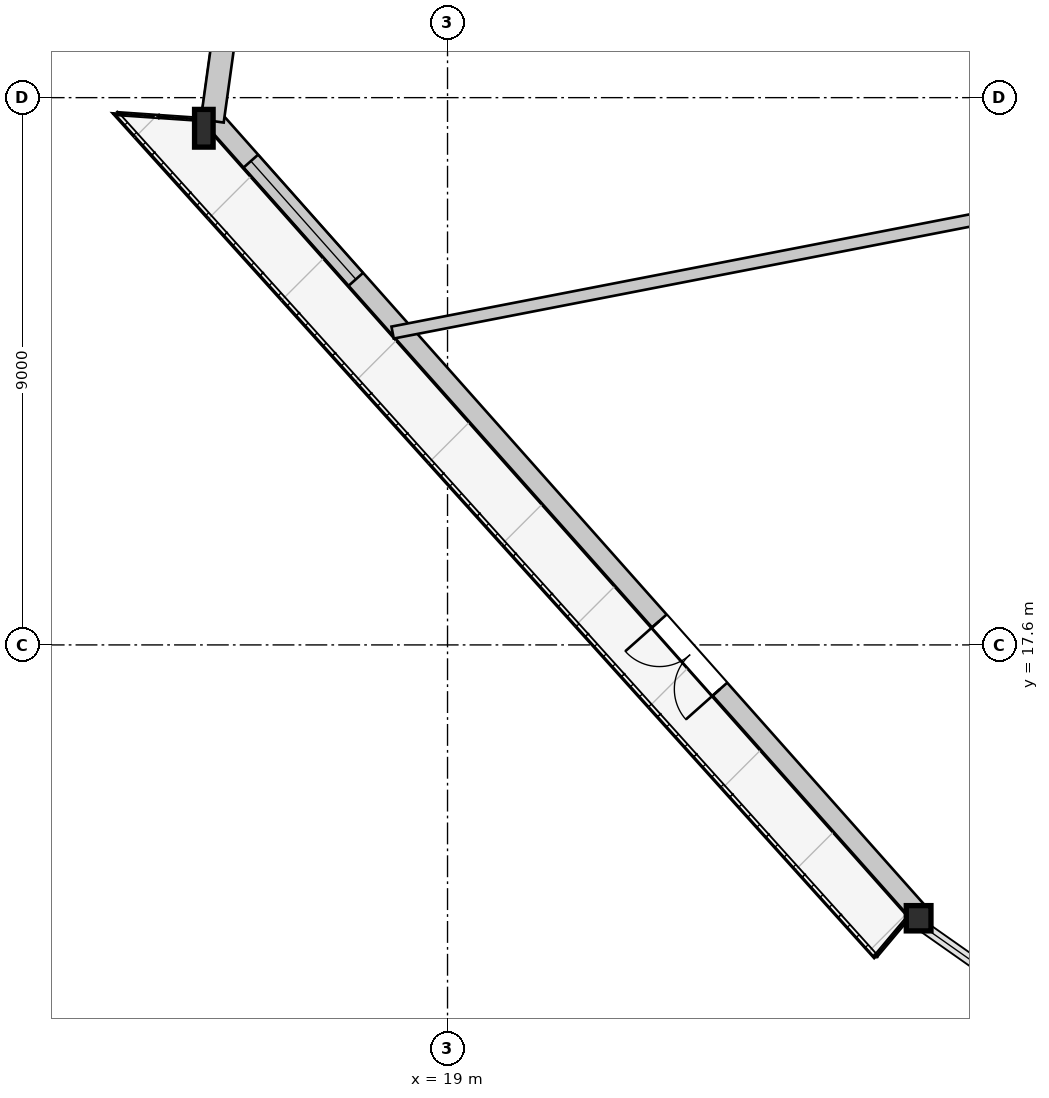
"""IFC4 building model, lengths in metres.
Left out: names, types, materials, properties, quantities, classifications, styles, units other than length and angle.
Written with IfcOpenShell. Run it as: python <this file> out.ifc"""

import sys

from ifc_helpers import new_model, si_unit, direction, frame, frame_2d, origin, origin_2d, place, context, subcontext, project, spatial, rectangle, i_section, extrude, source, transform, mapped, element, fill, save


model = new_model("IFC4")
c1 = context("Model", 3, precision=1e-05, world=origin(), true_north=direction((0.0, 1.0)))
c2 = subcontext(c1, "Body", "Model", "MODEL_VIEW")
j1 = project(units=[si_unit("LENGTHUNIT", "METRE"), si_unit("PLANEANGLEUNIT", "RADIAN")], contexts=[c1])
p1 = place(None, origin())
s1 = spatial("IfcSite", under=j1, at=p1, CompositionType="ELEMENT")
p2 = place(p1, origin())
s2 = spatial("IfcBuilding", under=s1, at=p2, CompositionType="ELEMENT")
p3 = place(p2, frame((0.0, 0.0, 238.1)))
s3 = spatial("IfcBuildingStorey", under=s2, at=p3, CompositionType="ELEMENT", Elevation=238.1)
m1 = source(origin(), c2, "Body", "SweptSolid", [
    extrude(i_section(OverallWidth=0.305, OverallDepth=0.62, WebThickness=0.021, FlangeThickness=0.04, at=origin_2d()), origin(), (0.0, 0.0, 1.0), 3.449),
])
p4 = place(p3, frame((14.942, 26.242, 0.0), z_axis=(0.028883824761, -0.084598457326, 0.99599639843), x_axis=(0.946361669056, 0.323109256046, 0.0)))
e1 = element("IfcColumn", 1, at=p4, inside=s3, PredefinedType="COLUMN", context=c2, shape_type="MappedRepresentation", body=[
    mapped(m1, transform((0.0, 0.0, 0.0), x_axis=(1.0, 0.0, 0.0), y_axis=(0.0, 1.0, 0.0), z_axis=(0.0, 0.0, 1.0), scale=1.0)),
])
m2 = source(origin(), c2, "Body", "SweptSolid", [
    extrude(i_section(OverallWidth=0.406, OverallDepth=0.416, WebThickness=0.027, FlangeThickness=0.042, at=origin_2d()), origin(), (0.0, 0.0, 1.0), 3.45),
])
p5 = place(p3, frame((26.589, 13.131, 0.0), z_axis=(0.091929151613, -0.015073833174, 0.995651450377), x_axis=(0.161811410383, 0.986821699939, 0.0)))
e2 = element("IfcColumn", 2, at=p5, inside=s3, PredefinedType="COLUMN", context=c2, shape_type="MappedRepresentation", body=[
    mapped(m2, transform((0.0, 0.0, 0.0), x_axis=(1.0, 0.0, 0.0), y_axis=(0.0, 1.0, 0.0), z_axis=(0.0, 0.0, 1.0), scale=1.0)),
])
p6 = place(p3, frame((26.709, 13.237, 0.0), z_axis=(0.0, 0.0, 1.0), x_axis=(-0.664123592236, 0.74762280211, 0.0)))
e3 = element("IfcWall", 3, at=p6, inside=s3, PredefinedType="SOLIDWALL", context=c2, shape_type="SweptSolid", body=[
    extrude(rectangle(XDim=17.537, YDim=0.32, at=frame_2d((8.769, 0.0))), origin(), (0.0, 0.0, 1.0), 2.872),
])
p7 = place(p6, frame((4.862, 0.0, 0.0)))
e4 = element("IfcOpeningElement", 4, at=p7, cuts=e3, PredefinedType="OPENING", context=c2, shape_type="SweptSolid", body=[
    extrude(rectangle(XDim=1.5, YDim=2.3, at=frame_2d((0.75, 1.15))), frame((0.0, 0.17, 0.0), z_axis=(0.0, -1.0, 0.0), x_axis=(1.0, 0.0, 0.0)), (0.0, 0.0, 1.0), 0.34),
])
p8 = place(p6, frame((13.878, 0.0, 0.402)))
e5 = element("IfcOpeningElement", 5, at=p8, cuts=e3, PredefinedType="OPENING", context=c2, shape_type="SweptSolid", body=[
    extrude(rectangle(XDim=2.6, YDim=2.35, at=frame_2d((1.3, 1.175))), frame((0.0, 0.17, 0.0), z_axis=(0.0, -1.0, 0.0), x_axis=(1.0, 0.0, 0.0)), (0.0, 0.0, 1.0), 0.34),
])
p9 = place(p3, frame((15.131, 26.216, 0.0), z_axis=(0.0, 0.0, 1.0), x_axis=(0.137394655233, 0.990516384879, 0.0)))
e6 = element("IfcWall", 6, at=p9, inside=s3, PredefinedType="SOLIDWALL", context=c2, shape_type="SweptSolid", body=[
    extrude(rectangle(XDim=3.524, YDim=0.38, at=frame_2d((1.762, 0.0))), origin(), (0.0, 0.0, 1.0), 2.872),
])
p10 = place(p3, frame((27.8, 24.62, 0.0), z_axis=(0.0, 0.0, 1.0), x_axis=(-0.981681019312, -0.190531824958, 0.0)))
e7 = element("IfcWall", 7, at=p10, inside=s3, PredefinedType="PARTITIONING", context=c2, shape_type="SweptSolid", body=[
    extrude(rectangle(XDim=9.885, YDim=0.2, at=frame_2d((4.942, 0.0))), origin(), (0.0, 0.0, 1.0), 3.38),
])
m3 = source(origin(), c2, "Body", "SweptSolid", [
    extrude(rectangle(XDim=1.5, YDim=2.3, at=frame_2d((0.75, 1.15))), frame((0.0, 0.025, 0.0), z_axis=(0.0, -1.0, 0.0), x_axis=(1.0, 0.0, 0.0)), (0.0, 0.0, 1.0), 0.05),
])
p11 = place(p7, origin())
e8 = element("IfcDoor", 8, at=p11, inside=s3, OperationType="DOUBLE_DOOR_SINGLE_SWING", PredefinedType="DOOR", context=c2, shape_type="MappedRepresentation", body=[
    mapped(m3, transform((0.0, 0.0, 0.0), x_axis=(1.0, 0.0, 0.0), y_axis=(0.0, 1.0, 0.0), z_axis=(0.0, 0.0, 1.0), scale=1.0)),
])
fill(e4, e8)
m4 = source(origin(), c2, "Body", "SweptSolid", [
    extrude(rectangle(XDim=2.6, YDim=2.35, at=frame_2d((1.3, 1.175))), frame((0.0, 0.03, 0.0), z_axis=(0.0, -1.0, 0.0), x_axis=(1.0, 0.0, 0.0)), (0.0, 0.0, 1.0), 0.06),
])
p12 = place(p8, origin())
e9 = element("IfcWindow", 9, at=p12, inside=s3, PartitioningType="SINGLE_PANEL", PredefinedType="WINDOW", context=c2, shape_type="MappedRepresentation", body=[
    mapped(m4, transform((0.0, 0.0, 0.0), x_axis=(1.0, 0.0, 0.0), y_axis=(0.0, 1.0, 0.0), z_axis=(0.0, 0.0, 1.0), scale=1.0)),
])
fill(e5, e9)
save(model, sys.argv[1])
